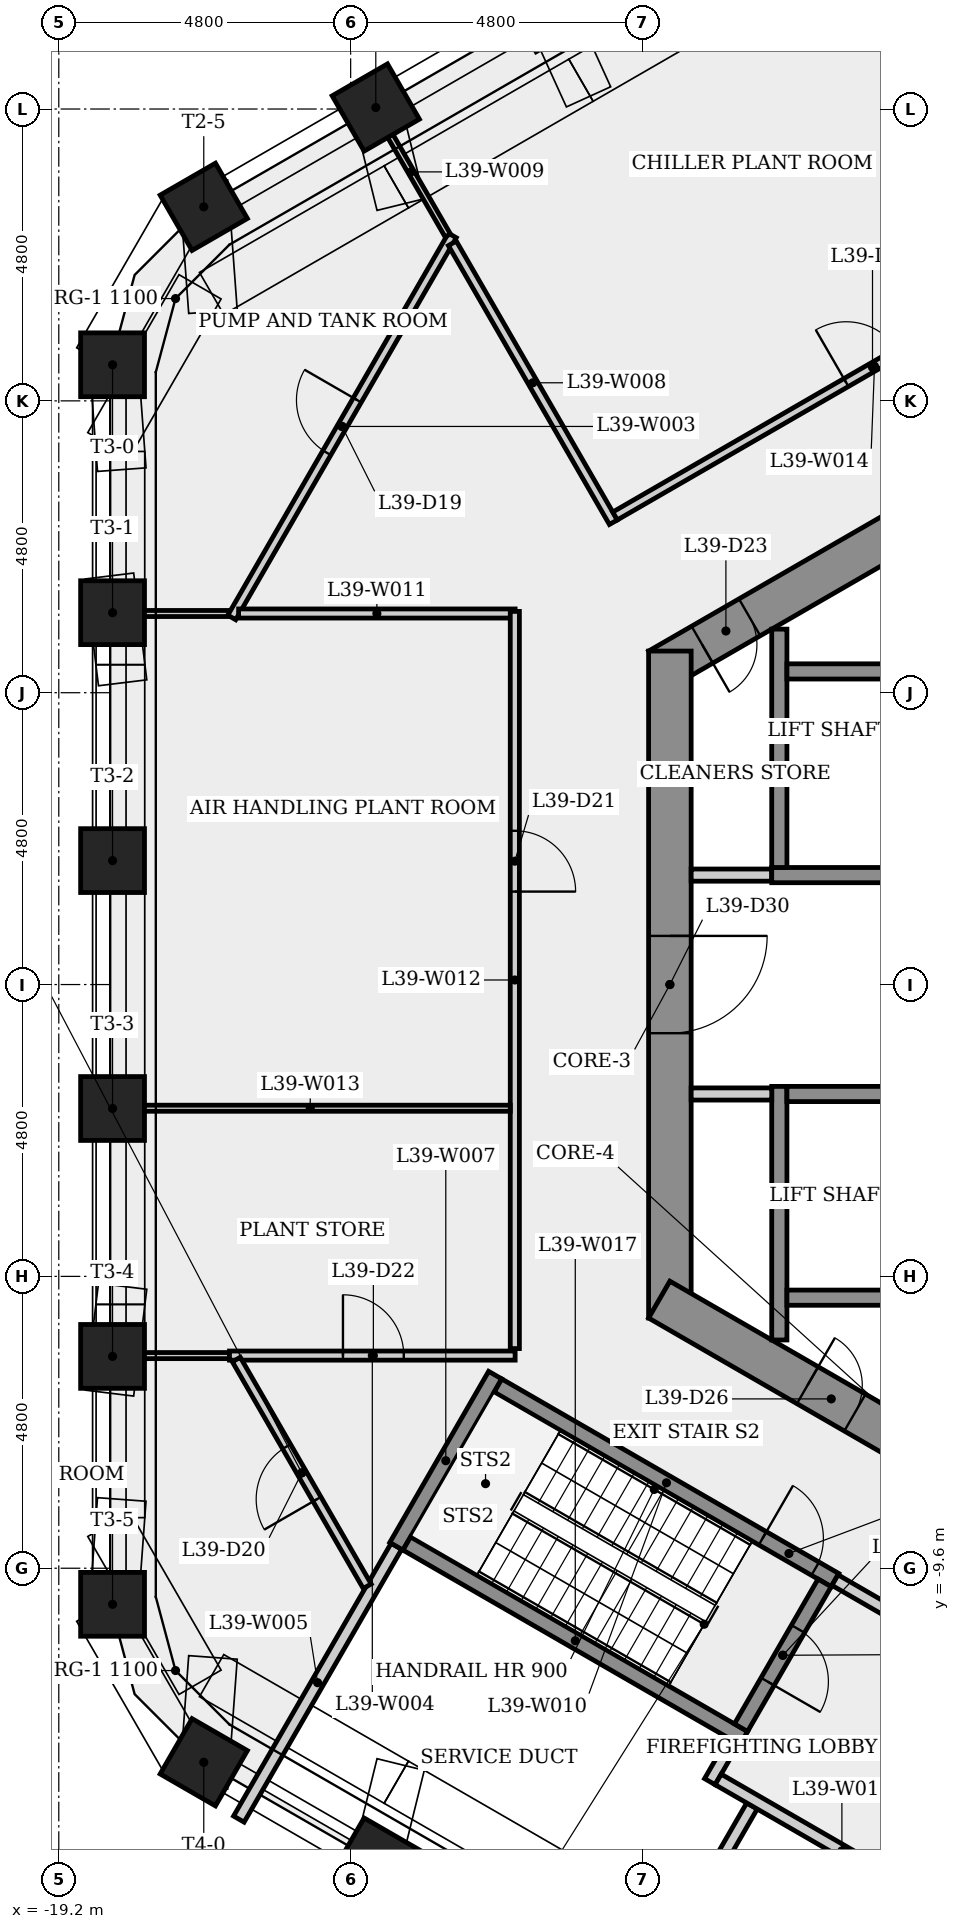
"""IFC4 building model, lengths in metres.
Left out: names, types, materials, properties, quantities, classifications, styles, units other than length and angle.
Written with IfcOpenShell. Run it as: python <this file> out.ifc"""

import sys

from ifc_helpers import new_model, si_unit, direction, frame, frame_2d, origin, origin_2d, place, context, subcontext, project, spatial, rectangle, extrude, element, fill, save


model = new_model("IFC4")
c1 = context("Model", 3, precision=1e-05, world=origin(), true_north=direction((0.0, 1.0)))
c2 = subcontext(c1, "Body", "Model", "MODEL_VIEW")
j1 = project(units=[si_unit("LENGTHUNIT", "METRE"), si_unit("PLANEANGLEUNIT", "RADIAN")], contexts=[c1])
p1 = place(None, origin())
s1 = spatial("IfcSite", under=j1, at=p1, CompositionType="ELEMENT")
p2 = place(p1, origin())
s2 = spatial("IfcBuilding", under=s1, at=p2, CompositionType="ELEMENT")
p3 = place(p2, frame((0.0, 0.0, 147.9)))
s3 = spatial("IfcBuildingStorey", under=s2, at=p3, CompositionType="ELEMENT", Elevation=147.9)
p4 = place(p3, frame((0.175, 10.667, 0.0), z_axis=(0.0, 0.0, 1.0), x_axis=(-0.866023993627, -0.500002442456, 0.0)))
e1 = element("IfcWall", 1, at=p4, inside=s3, PredefinedType="SHEAR", context=c2, shape_type="SweptSolid", body=[
    extrude(rectangle(XDim=10.97, YDim=0.7, at=frame_2d((5.485, 0.0))), origin(), (0.0, 0.0, 1.0), 4.8),
])
p5 = place(p4, frame((9.254, 0.0, 0.0)))
e2 = element("IfcOpeningElement", 2, at=p5, cuts=e1, PredefinedType="OPENING", context=c2, shape_type="SweptSolid", body=[
    extrude(rectangle(XDim=0.9, YDim=2.1, at=frame_2d((0.45, 1.05))), frame((0.0, 0.36, 0.0), z_axis=(0.0, -1.0, 0.0), x_axis=(1.0, 0.0, 0.0)), (0.0, 0.0, 1.0), 0.72),
])
p6 = place(p4, frame((2.033, 0.0, 0.0)))
e3 = element("IfcOpeningElement", 3, at=p6, cuts=e1, PredefinedType="OPENING", context=c2, shape_type="SweptSolid", body=[
    extrude(rectangle(XDim=0.9, YDim=2.1, at=frame_2d((0.45, 1.05))), frame((0.0, 0.36, 0.0), z_axis=(0.0, -1.0, 0.0), x_axis=(1.0, 0.0, 0.0)), (0.0, 0.0, 1.0), 0.72),
])
p7 = place(p3, frame((-9.15, 5.485, 0.0), z_axis=(0.0, 0.0, 1.0), x_axis=(0.0, -1.0, 0.0)))
e4 = element("IfcWall", 4, at=p7, inside=s3, PredefinedType="SHEAR", context=c2, shape_type="SweptSolid", body=[
    extrude(rectangle(XDim=10.97, YDim=0.7, at=frame_2d((5.485, 0.0))), origin(), (0.0, 0.0, 1.0), 4.8),
])
p8 = place(p7, frame((4.685, 0.0, 0.0)))
e5 = element("IfcOpeningElement", 5, at=p8, cuts=e4, PredefinedType="OPENING", context=c2, shape_type="SweptSolid", body=[
    extrude(rectangle(XDim=1.6, YDim=2.1, at=frame_2d((0.8, 1.05))), frame((0.0, 0.36, 0.0), z_axis=(0.0, -1.0, 0.0), x_axis=(1.0, 0.0, 0.0)), (0.0, 0.0, 1.0), 0.72),
])
p9 = place(p3, frame((-9.325, -5.182, 0.0), z_axis=(0.0, 0.0, 1.0), x_axis=(0.866023993627, -0.500002442456, 0.0)))
e6 = element("IfcWall", 6, at=p9, inside=s3, PredefinedType="SHEAR", context=c2, shape_type="SweptSolid", body=[
    extrude(rectangle(XDim=10.97, YDim=0.7, at=frame_2d((5.485, 0.0))), origin(), (0.0, 0.0, 1.0), 4.8),
])
p10 = place(p9, frame((2.817, 0.0, 0.0)))
e7 = element("IfcOpeningElement", 7, at=p10, cuts=e6, PredefinedType="OPENING", context=c2, shape_type="SweptSolid", body=[
    extrude(rectangle(XDim=0.9, YDim=2.1, at=frame_2d((0.45, 1.05))), frame((0.0, 0.36, 0.0), z_axis=(0.0, -1.0, 0.0), x_axis=(1.0, 0.0, 0.0)), (0.0, 0.0, 1.0), 0.72),
])
for number, where, z_axis, x_axis in (
    (8, (-11.157, 16.058, 0.0), (0.0, 0.0, 1.0), (-0.5, 0.866, 0.0)),
    (9, (-13.987, 14.425, 0.0), (0.0, 0.0, 1.0), (-0.5, 0.866, 0.0)),
    (10, (-16.816, 12.792, 0.0), (0.0, 0.0, 1.0), (-0.5, 0.866, 0.0)),
    (11, (-18.316, 10.193, 0.0), (0.0, 0.0, 1.0), (-1.0, 0.0, 0.0)),
    (12, (-18.316, 6.116, 0.0), (0.0, 0.0, 1.0), (-1.0, 0.0, 0.0)),
    (13, (-18.316, 2.039, 0.0), (0.0, 0.0, 1.0), (-1.0, 0.0, 0.0)),
    (14, (-18.316, -2.039, 0.0), (0.0, 0.0, 1.0), (-1.0, 0.0, 0.0)),
    (15, (-18.316, -6.116, 0.0), (0.0, 0.0, 1.0), (-1.0, 0.0, 0.0)),
    (16, (-18.316, -10.193, 0.0), (0.0, 0.0, 1.0), (-1.0, 0.0, 0.0)),
    (17, (-16.816, -12.792, 0.0), (0.0, 0.0, 1.0), (-0.5, -0.866, 0.0)),
    (18, (-13.987, -14.425, 0.0), (0.0, 0.0, 1.0), (-0.5, -0.866, 0.0)),
):
    element("IfcColumn", number, at=place(p3, frame(where, z_axis=z_axis, x_axis=x_axis)), inside=s3, PredefinedType="COLUMN", context=c2, shape_type="SweptSolid", body=[
        extrude(rectangle(XDim=1.05, YDim=1.05, at=origin_2d()), origin(), (0.0, 0.0, 1.0), 4.45),
    ])
for number, where, z_axis, x_axis in (
    (19, (-18.354, -6.103, 0.0), (0.0, 0.0, 1.0), (1.0, 0.0, 0.0)),
    (20, (-16.393, 6.103, 0.0), (0.0, 0.0, 1.0), (-1.0, 0.0, 0.0)),
):
    element("IfcWall", number, at=place(p3, frame(where, z_axis=z_axis, x_axis=x_axis)), inside=s3, PredefinedType="PARTITIONING", context=c2, shape_type="SweptSolid", body=[
        extrude(rectangle(XDim=1.962, YDim=0.1, at=frame_2d((0.981, 0.0))), origin(), (0.0, 0.0, 1.0), 4.45),
    ])
p11 = place(p3, frame((-16.355, 6.038, 0.0), z_axis=(0.0, 0.0, 1.0), x_axis=(0.499982673273, 0.866035407144, 0.0)))
e21 = element("IfcWall", 21, at=p11, inside=s3, PredefinedType="PARTITIONING", context=c2, shape_type="SweptSolid", body=[
    extrude(rectangle(XDim=7.255, YDim=0.15, at=frame_2d((3.627, 0.0))), origin(), (0.0, 0.0, 1.0), 4.45),
])
p12 = place(p11, frame((3.127, 0.0, 0.0)))
e22 = element("IfcOpeningElement", 22, at=p12, cuts=e21, PredefinedType="OPENING", context=c2, shape_type="SweptSolid", body=[
    extrude(rectangle(XDim=1.0, YDim=2.1, at=frame_2d((0.5, 1.05))), frame((0.0, 0.085, 0.0), z_axis=(0.0, -1.0, 0.0), x_axis=(1.0, 0.0, 0.0)), (0.0, 0.0, 1.0), 0.17),
])
p13 = place(p3, frame((-16.393, -6.103, 0.0), z_axis=(0.0, 0.0, 1.0), x_axis=(1.0, 0.0, 0.0)))
e23 = element("IfcWall", 23, at=p13, inside=s3, PredefinedType="PARTITIONING", context=c2, shape_type="SweptSolid", body=[
    extrude(rectangle(XDim=4.698, YDim=0.15, at=frame_2d((2.349, 0.0))), origin(), (0.0, 0.0, 1.0), 4.45),
])
p14 = place(p13, frame((1.866, 0.0, 0.0)))
e24 = element("IfcOpeningElement", 24, at=p14, cuts=e23, PredefinedType="OPENING", context=c2, shape_type="SweptSolid", body=[
    extrude(rectangle(XDim=1.0, YDim=2.1, at=frame_2d((0.5, 1.05))), frame((0.0, 0.085, 0.0), z_axis=(0.0, -1.0, 0.0), x_axis=(1.0, 0.0, 0.0)), (0.0, 0.0, 1.0), 0.17),
])
p15 = place(p3, frame((-16.239, -13.726, 0.0), z_axis=(0.0, 0.0, 1.0), x_axis=(0.499990271856, 0.866031020258, 0.0)))
e25 = element("IfcWall", 25, at=p15, inside=s3, PredefinedType="PLUMBINGWALL", context=c2, shape_type="SweptSolid", body=[
    extrude(rectangle(XDim=5.182, YDim=0.2, at=frame_2d((2.591, 0.0))), origin(), (0.0, 0.0, 1.0), 4.45),
])
p16 = place(p3, frame((-14.127, -9.896, 0.0), z_axis=(0.0, 0.0, 1.0), x_axis=(-0.500005500391, 0.866022228109, 0.0)))
e26 = element("IfcWall", 26, at=p16, inside=s3, PredefinedType="PARTITIONING", context=c2, shape_type="SweptSolid", body=[
    extrude(rectangle(XDim=4.306, YDim=0.15, at=frame_2d((2.153, 0.0))), origin(), (0.0, 0.0, 1.0), 4.45),
])
p17 = place(p16, frame((1.653, 0.0, 0.0)))
e27 = element("IfcOpeningElement", 27, at=p17, cuts=e26, PredefinedType="OPENING", context=c2, shape_type="SweptSolid", body=[
    extrude(rectangle(XDim=1.0, YDim=2.1, at=frame_2d((0.5, 1.05))), frame((0.0, 0.085, 0.0), z_axis=(0.0, -1.0, 0.0), x_axis=(1.0, 0.0, 0.0)), (0.0, 0.0, 1.0), 0.17),
])
p18 = place(p3, frame((-13.648, -9.239, 0.0), z_axis=(0.0, 0.0, 1.0), x_axis=(0.500017246033, 0.866015446554, 0.0)))
e28 = element("IfcWall", 28, at=p18, inside=s3, PredefinedType="SHEAR", context=c2, shape_type="SweptSolid", body=[
    extrude(rectangle(XDim=3.25, YDim=0.25, at=frame_2d((1.625, 0.0))), origin(), (0.0, 0.0, 1.0), 4.45),
])
p19 = place(p3, frame((-12.728, 12.191, 0.0), z_axis=(0.0, 0.0, 1.0), x_axis=(0.499991120112, -0.86603053053, 0.0)))
e29 = element("IfcWall", 29, at=p19, inside=s3, PredefinedType="PARTITIONING", context=c2, shape_type="SweptSolid", body=[
    extrude(rectangle(XDim=5.296, YDim=0.15, at=frame_2d((2.648, 0.0))), origin(), (0.0, 0.0, 1.0), 4.45),
])
p20 = place(p3, frame((-12.803, 12.321, 0.0), z_axis=(0.0, 0.0, 1.0), x_axis=(-0.499967560512, 0.866044131922, 0.0)))
e30 = element("IfcWall", 30, at=p20, inside=s3, PredefinedType="PARTITIONING", context=c2, shape_type="SweptSolid", body=[
    extrude(rectangle(XDim=2.414, YDim=0.1, at=frame_2d((1.207, 0.0))), origin(), (0.0, 0.0, 1.0), 4.45),
])
p21 = place(p3, frame((-11.977, -6.595, 0.0), z_axis=(0.0, 0.0, 1.0), x_axis=(0.866025499775, -0.499999833739, 0.0)))
e31 = element("IfcWall", 31, at=p21, inside=s3, PredefinedType="SHEAR", context=c2, shape_type="SweptSolid", body=[
    extrude(rectangle(XDim=6.4, YDim=0.25, at=frame_2d((3.2, 0.0))), origin(), (0.0, 0.0, 1.0), 4.45),
])
p22 = place(p21, frame((5.025, 0.0, 0.0)))
e32 = element("IfcOpeningElement", 32, at=p22, cuts=e31, PredefinedType="OPENING", context=c2, shape_type="SweptSolid", body=[
    extrude(rectangle(XDim=1.0, YDim=2.1, at=frame_2d((0.5, 1.05))), frame((0.0, 0.135, 0.0), z_axis=(0.0, -1.0, 0.0), x_axis=(1.0, 0.0, 0.0)), (0.0, 0.0, 1.0), 0.27),
])
p23 = place(p3, frame((-11.695, 6.103, 0.0), z_axis=(0.0, 0.0, 1.0), x_axis=(-1.0, 0.0, 0.0)))
e33 = element("IfcWall", 33, at=p23, inside=s3, PredefinedType="PARTITIONING", context=c2, shape_type="SweptSolid", body=[
    extrude(rectangle(XDim=4.548, YDim=0.15, at=frame_2d((2.274, 0.0))), origin(), (0.0, 0.0, 1.0), 4.45),
])
p24 = place(p3, frame((-11.7, 6.137, 0.0), z_axis=(0.0, 0.0, 1.0), x_axis=(0.0, -1.0, 0.0)))
e34 = element("IfcWall", 34, at=p24, inside=s3, PredefinedType="PARTITIONING", context=c2, shape_type="SweptSolid", body=[
    extrude(rectangle(XDim=12.125, YDim=0.15, at=frame_2d((6.062, 0.0))), origin(), (0.0, 0.0, 1.0), 4.45),
])
p25 = place(p24, frame((3.608, 0.0, 0.0)))
e35 = element("IfcOpeningElement", 35, at=p25, cuts=e34, PredefinedType="OPENING", context=c2, shape_type="SweptSolid", body=[
    extrude(rectangle(XDim=1.0, YDim=2.1, at=frame_2d((0.5, 1.05))), frame((0.0, 0.085, 0.0), z_axis=(0.0, -1.0, 0.0), x_axis=(1.0, 0.0, 0.0)), (0.0, 0.0, 1.0), 0.17),
])
p26 = place(p3, frame((-11.775, -2.034, 0.0), z_axis=(0.0, 0.0, 1.0), x_axis=(-1.0, 0.0, 0.0)))
e36 = element("IfcWall", 36, at=p26, inside=s3, PredefinedType="PARTITIONING", context=c2, shape_type="SweptSolid", body=[
    extrude(rectangle(XDim=6.58, YDim=0.1, at=frame_2d((3.29, 0.0))), origin(), (0.0, 0.0, 1.0), 4.45),
])
p27 = place(p3, frame((-10.052, 7.706, 0.0), z_axis=(0.0, 0.0, 1.0), x_axis=(0.866017665152, 0.500013403465, 0.0)))
e37 = element("IfcWall", 37, at=p27, inside=s3, PredefinedType="PARTITIONING", context=c2, shape_type="SweptSolid", body=[
    extrude(rectangle(XDim=9.854, YDim=0.15, at=frame_2d((4.927, 0.0))), origin(), (0.0, 0.0, 1.0), 4.45),
])
p28 = place(p27, frame((4.39, 0.0, 0.0)))
e38 = element("IfcOpeningElement", 38, at=p28, cuts=e37, PredefinedType="OPENING", context=c2, shape_type="SweptSolid", body=[
    extrude(rectangle(XDim=1.0, YDim=2.1, at=frame_2d((0.5, 1.05))), frame((0.0, 0.085, 0.0), z_axis=(0.0, -1.0, 0.0), x_axis=(1.0, 0.0, 0.0)), (0.0, 0.0, 1.0), 0.17),
])
p29 = place(p3, frame((-8.8, 1.8, 0.0), z_axis=(0.0, 0.0, 1.0), x_axis=(1.0, 0.0, 0.0)))
e39 = element("IfcWall", 39, at=p29, inside=s3, PredefinedType="PARTITIONING", context=c2, shape_type="SweptSolid", body=[
    extrude(rectangle(XDim=1.325, YDim=0.2, at=frame_2d((0.663, 0.0))), origin(), (0.0, 0.0, 1.0), 4.45),
])
p30 = place(p3, frame((-8.493, -13.11, 0.0), z_axis=(0.0, 0.0, 1.0), x_axis=(0.500067724834, 0.865986299303, 0.0)))
e40 = element("IfcWall", 40, at=p30, inside=s3, PredefinedType="PLUMBINGWALL", context=c2, shape_type="SweptSolid", body=[
    extrude(rectangle(XDim=0.775, YDim=0.2, at=frame_2d((0.388, 0.0))), origin(), (0.0, 0.0, 1.0), 4.45),
])
p31 = place(p3, frame((-7.935, -12.393, 0.0), z_axis=(0.0, 0.0, 1.0), x_axis=(-0.866025499775, 0.499999833739, 0.0)))
e41 = element("IfcWall", 41, at=p31, inside=s3, PredefinedType="SHEAR", context=c2, shape_type="SweptSolid", body=[
    extrude(rectangle(XDim=6.4, YDim=0.25, at=frame_2d((3.2, 0.0))), origin(), (0.0, 0.0, 1.0), 4.45),
])
p32 = place(p3, frame((-7.8, -13.51, 0.0), z_axis=(0.0, 0.0, 1.0), x_axis=(-0.5000181976, -0.86601489714, 0.0)))
e42 = element("IfcWall", 42, at=p32, inside=s3, PredefinedType="PLUMBINGWALL", context=c2, shape_type="SweptSolid", body=[
    extrude(rectangle(XDim=4.406, YDim=0.2, at=frame_2d((2.203, 0.0))), origin(), (0.0, 0.0, 1.0), 4.45),
])
p33 = place(p3, frame((-8.356, -13.073, 0.0), z_axis=(0.0, 0.0, 1.0), x_axis=(0.866038532462, -0.499977259774, 0.0)))
e43 = element("IfcWall", 43, at=p33, inside=s3, PredefinedType="PLUMBINGWALL", context=c2, shape_type="SweptSolid", body=[
    extrude(rectangle(XDim=4.7, YDim=0.2, at=frame_2d((2.35, 0.0))), origin(), (0.0, 0.0, 1.0), 4.45),
])
p34 = place(p3, frame((-7.475, 1.8, 0.0), z_axis=(0.0, 0.0, 1.0), x_axis=(1.0, 0.0, 0.0)))
e44 = element("IfcWall", 44, at=p34, inside=s3, PredefinedType="SHEAR", context=c2, shape_type="SweptSolid", body=[
    extrude(rectangle(XDim=14.95, YDim=0.25, at=frame_2d((7.475, 0.0))), origin(), (0.0, 0.0, 1.0), 4.45),
])
p35 = place(p3, frame((-7.35, -5.846, 0.0), z_axis=(0.0, 0.0, 1.0), x_axis=(0.0, 1.0, 0.0)))
e45 = element("IfcWall", 45, at=p35, inside=s3, PredefinedType="SHEAR", context=c2, shape_type="SweptSolid", body=[
    extrude(rectangle(XDim=4.171, YDim=0.25, at=frame_2d((2.085, 0.0))), origin(), (0.0, 0.0, 1.0), 4.45),
])
p36 = place(p3, frame((-7.35, 1.925, 0.0), z_axis=(0.0, 0.0, 1.0), x_axis=(0.0, 1.0, 0.0)))
e46 = element("IfcWall", 46, at=p36, inside=s3, PredefinedType="SHEAR", context=c2, shape_type="SweptSolid", body=[
    extrude(rectangle(XDim=3.921, YDim=0.25, at=frame_2d((1.96, 0.0))), origin(), (0.0, 0.0, 1.0), 4.45),
])
p37 = place(p3, frame((-7.225, 5.15, 0.0), z_axis=(0.0, 0.0, 1.0), x_axis=(1.0, 0.0, 0.0)))
e47 = element("IfcWall", 47, at=p37, inside=s3, PredefinedType="SHEAR", context=c2, shape_type="SweptSolid", body=[
    extrude(rectangle(XDim=14.7, YDim=0.25, at=frame_2d((7.35, 0.0))), origin(), (0.0, 0.0, 1.0), 4.45),
])
p38 = place(p3, frame((-7.475, -1.8, 0.0), z_axis=(0.0, 0.0, 1.0), x_axis=(-1.0, 0.0, 0.0)))
e48 = element("IfcWall", 48, at=p38, inside=s3, PredefinedType="PARTITIONING", context=c2, shape_type="SweptSolid", body=[
    extrude(rectangle(XDim=1.325, YDim=0.2, at=frame_2d((0.663, 0.0))), origin(), (0.0, 0.0, 1.0), 4.45),
])
p39 = place(p3, frame((-6.605, -9.841, 0.0), z_axis=(0.0, 0.0, 1.0), x_axis=(-0.499996545922, -0.866027397988, 0.0)))
e49 = element("IfcWall", 49, at=p39, inside=s3, PredefinedType="SHEAR", context=c2, shape_type="SweptSolid", body=[
    extrude(rectangle(XDim=2.75, YDim=0.25, at=frame_2d((1.375, 0.0))), origin(), (0.0, 0.0, 1.0), 4.45),
])
p40 = place(p39, frame((0.875, 0.0, 0.0)))
e50 = element("IfcOpeningElement", 50, at=p40, cuts=e49, PredefinedType="OPENING", context=c2, shape_type="SweptSolid", body=[
    extrude(rectangle(XDim=1.0, YDim=2.1, at=frame_2d((0.5, 1.05))), frame((0.0, 0.135, 0.0), z_axis=(0.0, -1.0, 0.0), x_axis=(1.0, 0.0, 0.0)), (0.0, 0.0, 1.0), 0.27),
])
p41 = place(p3, frame((-6.435, -9.795, 0.0), z_axis=(0.0, 0.0, 1.0), x_axis=(0.866012907634, -0.500021643343, 0.0)))
e51 = element("IfcWall", 51, at=p41, inside=s3, PredefinedType="PARTITIONING", context=c2, shape_type="SweptSolid", body=[
    extrude(rectangle(XDim=4.45, YDim=0.2, at=frame_2d((2.225, 0.0))), origin(), (0.0, 0.0, 1.0), 4.45),
])
p42 = place(p41, frame((1.675, 0.0, 0.0)))
e52 = element("IfcOpeningElement", 52, at=p42, cuts=e51, PredefinedType="OPENING", context=c2, shape_type="SweptSolid", body=[
    extrude(rectangle(XDim=1.1, YDim=2.1, at=frame_2d((0.55, 1.05))), frame((0.0, 0.11, 0.0), z_axis=(0.0, -1.0, 0.0), x_axis=(1.0, 0.0, 0.0)), (0.0, 0.0, 1.0), 0.22),
])
p43 = place(p3, frame((-7.225, -5.15, 0.0), z_axis=(0.0, 0.0, 1.0), x_axis=(1.0, 0.0, 0.0)))
e53 = element("IfcWall", 53, at=p43, inside=s3, PredefinedType="SHEAR", context=c2, shape_type="SweptSolid", body=[
    extrude(rectangle(XDim=14.7, YDim=0.25, at=frame_2d((7.35, 0.0))), origin(), (0.0, 0.0, 1.0), 4.45),
])
p44 = place(p3, frame((-7.225, -1.8, 0.0), z_axis=(0.0, 0.0, 1.0), x_axis=(1.0, 0.0, 0.0)))
e54 = element("IfcWall", 54, at=p44, inside=s3, PredefinedType="SHEAR", context=c2, shape_type="SweptSolid", body=[
    extrude(rectangle(XDim=14.7, YDim=0.25, at=frame_2d((7.35, 0.0))), origin(), (0.0, 0.0, 1.0), 4.45),
])
p45 = place(p44, frame((10.35, 0.0, 0.0)))
e55 = element("IfcOpeningElement", 55, at=p45, cuts=e54, PredefinedType="OPENING", context=c2, shape_type="SweptSolid", body=[
    extrude(rectangle(XDim=1.1, YDim=2.1, at=frame_2d((0.55, 1.05))), frame((0.0, 0.135, 0.0), z_axis=(0.0, -1.0, 0.0), x_axis=(1.0, 0.0, 0.0)), (0.0, 0.0, 1.0), 0.27),
])
p46 = place(p22, origin())
e56 = element("IfcDoor", 56, at=p46, inside=s3, OperationType="SINGLE_SWING_LEFT", PredefinedType="DOOR", context=c2, shape_type="SweptSolid", body=[
    extrude(rectangle(XDim=1.0, YDim=2.1, at=frame_2d((0.5, 1.05))), frame((0.0, 0.025, 0.0), z_axis=(0.0, -1.0, 0.0), x_axis=(1.0, 0.0, 0.0)), (0.0, 0.0, 1.0), 0.05),
])
fill(e32, e56)
p47 = place(p40, origin())
e57 = element("IfcDoor", 57, at=p47, inside=s3, OperationType="SINGLE_SWING_RIGHT", PredefinedType="DOOR", context=c2, shape_type="SweptSolid", body=[
    extrude(rectangle(XDim=1.0, YDim=2.1, at=frame_2d((0.5, 1.05))), frame((0.0, 0.025, 0.0), z_axis=(0.0, -1.0, 0.0), x_axis=(1.0, 0.0, 0.0)), (0.0, 0.0, 1.0), 0.05),
])
fill(e50, e57)
p48 = place(p28, origin())
e58 = element("IfcDoor", 58, at=p48, inside=s3, OperationType="SINGLE_SWING_LEFT", PredefinedType="DOOR", context=c2, shape_type="SweptSolid", body=[
    extrude(rectangle(XDim=1.0, YDim=2.1, at=frame_2d((0.5, 1.05))), frame((0.0, 0.025, 0.0), z_axis=(0.0, -1.0, 0.0), x_axis=(1.0, 0.0, 0.0)), (0.0, 0.0, 1.0), 0.05),
])
fill(e38, e58)
p49 = place(p12, origin())
e59 = element("IfcDoor", 59, at=p49, inside=s3, OperationType="SINGLE_SWING_RIGHT", PredefinedType="DOOR", context=c2, shape_type="SweptSolid", body=[
    extrude(rectangle(XDim=1.0, YDim=2.1, at=frame_2d((0.5, 1.05))), frame((0.0, 0.025, 0.0), z_axis=(0.0, -1.0, 0.0), x_axis=(1.0, 0.0, 0.0)), (0.0, 0.0, 1.0), 0.05),
])
fill(e22, e59)
p50 = place(p17, origin())
e60 = element("IfcDoor", 60, at=p50, inside=s3, OperationType="SINGLE_SWING_LEFT", PredefinedType="DOOR", context=c2, shape_type="SweptSolid", body=[
    extrude(rectangle(XDim=1.0, YDim=2.1, at=frame_2d((0.5, 1.05))), frame((0.0, 0.025, 0.0), z_axis=(0.0, -1.0, 0.0), x_axis=(1.0, 0.0, 0.0)), (0.0, 0.0, 1.0), 0.05),
])
fill(e27, e60)
p51 = place(p25, origin())
e61 = element("IfcDoor", 61, at=p51, inside=s3, OperationType="SINGLE_SWING_RIGHT", PredefinedType="DOOR", context=c2, shape_type="SweptSolid", body=[
    extrude(rectangle(XDim=1.0, YDim=2.1, at=frame_2d((0.5, 1.05))), frame((0.0, 0.025, 0.0), z_axis=(0.0, -1.0, 0.0), x_axis=(1.0, 0.0, 0.0)), (0.0, 0.0, 1.0), 0.05),
])
fill(e35, e61)
p52 = place(p14, origin())
e62 = element("IfcDoor", 62, at=p52, inside=s3, OperationType="SINGLE_SWING_LEFT", PredefinedType="DOOR", context=c2, shape_type="SweptSolid", body=[
    extrude(rectangle(XDim=1.0, YDim=2.1, at=frame_2d((0.5, 1.05))), frame((0.0, 0.025, 0.0), z_axis=(0.0, -1.0, 0.0), x_axis=(1.0, 0.0, 0.0)), (0.0, 0.0, 1.0), 0.05),
])
fill(e24, e62)
p53 = place(p5, origin())
e63 = element("IfcDoor", 63, at=p53, inside=s3, OperationType="SINGLE_SWING_RIGHT", PredefinedType="DOOR", context=c2, shape_type="SweptSolid", body=[
    extrude(rectangle(XDim=0.9, YDim=2.1, at=frame_2d((0.45, 1.05))), frame((0.0, 0.025, 0.0), z_axis=(0.0, -1.0, 0.0), x_axis=(1.0, 0.0, 0.0)), (0.0, 0.0, 1.0), 0.05),
])
fill(e2, e63)
p54 = place(p10, origin())
e64 = element("IfcDoor", 64, at=p54, inside=s3, OperationType="SINGLE_SWING_LEFT", PredefinedType="DOOR", context=c2, shape_type="SweptSolid", body=[
    extrude(rectangle(XDim=0.9, YDim=2.1, at=frame_2d((0.45, 1.05))), frame((0.0, 0.025, 0.0), z_axis=(0.0, -1.0, 0.0), x_axis=(1.0, 0.0, 0.0)), (0.0, 0.0, 1.0), 0.05),
])
fill(e7, e64)
p55 = place(p8, origin())
e65 = element("IfcDoor", 65, at=p55, inside=s3, OperationType="SINGLE_SWING_LEFT", PredefinedType="DOOR", context=c2, shape_type="SweptSolid", body=[
    extrude(rectangle(XDim=1.6, YDim=2.1, at=frame_2d((0.8, 1.05))), frame((0.0, 0.025, 0.0), z_axis=(0.0, -1.0, 0.0), x_axis=(1.0, 0.0, 0.0)), (0.0, 0.0, 1.0), 0.05),
])
fill(e5, e65)
save(model, sys.argv[1])
